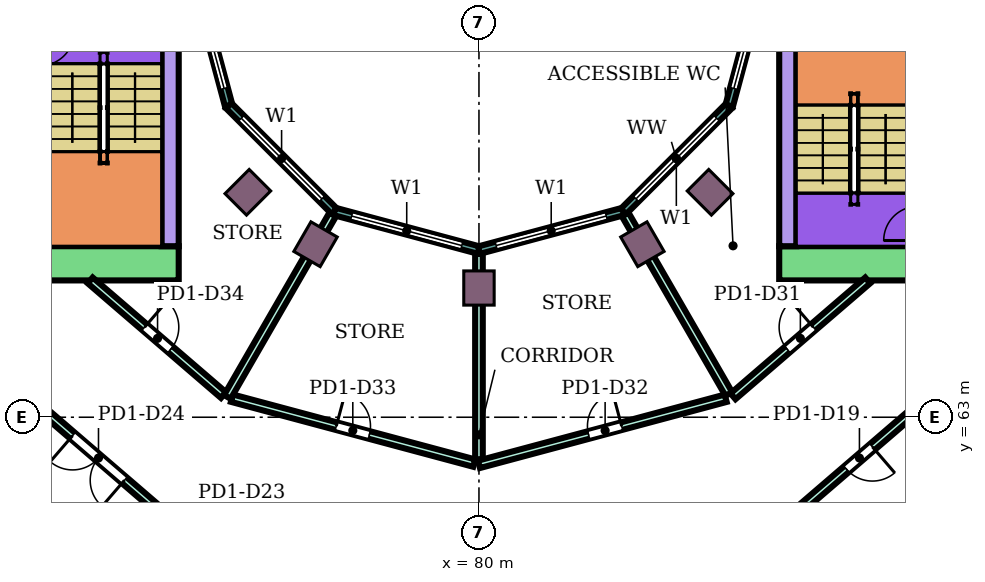
"""IFC4 building model, lengths in metres.
Left out: names, types, materials, properties, quantities, classifications, styles, units other than length and angle.
Written with IfcOpenShell. Run it as: python <this file> out.ifc"""

import sys

from ifc_helpers import new_model, si_unit, direction, frame, frame_2d, origin, origin_2d, place, context, subcontext, project, spatial, rectangle, extrude, element, fill, save


model = new_model("IFC4")
c1 = context("Model", 3, precision=1e-05, world=origin(), true_north=direction((0.0, 1.0)))
c2 = subcontext(c1, "Body", "Model", "MODEL_VIEW")
j1 = project(units=[si_unit("LENGTHUNIT", "METRE"), si_unit("PLANEANGLEUNIT", "RADIAN")], contexts=[c1])
p1 = place(None, origin())
s1 = spatial("IfcSite", under=j1, at=p1, CompositionType="ELEMENT")
p2 = place(p1, origin())
s2 = spatial("IfcBuilding", under=s1, at=p2, CompositionType="ELEMENT")
p3 = place(p2, frame((0.0, 0.0, 7.0)))
s3 = spatial("IfcBuildingStorey", under=s2, at=p3, CompositionType="ELEMENT", Elevation=7.0)
for number, where, z_axis, x_axis in (
    (1, (73.919, 68.919, 0.0), (0.0, 0.0, 1.0), (-0.707, -0.707, 0.0)),
    (2, (75.7, 67.552, 0.0), (0.0, 0.0, 1.0), (-0.5, -0.866, 0.0)),
    (3, (80.0, 66.4, 0.0), (0.0, 0.0, 1.0), (0.0, -1.0, 0.0)),
    (4, (84.3, 67.552, 0.0), (0.0, 0.0, 1.0), (0.5, -0.866, 0.0)),
    (5, (86.081, 68.919, 0.0), (0.0, 0.0, 1.0), (0.707, -0.707, 0.0)),
):
    element("IfcColumn", number, at=place(p3, frame(where, z_axis=z_axis, x_axis=x_axis)), inside=s3, PredefinedType="COLUMN", context=c2, shape_type="SweptSolid", body=[
        extrude(rectangle(XDim=0.9, YDim=0.8, at=origin_2d()), origin(), (0.0, 0.0, 1.0), 5.4),
    ])
p4 = place(p3, frame((87.9, 67.05, 0.0), z_axis=(0.0, 0.0, 1.0), x_axis=(1.0, 0.0, 0.0)))
e6 = element("IfcWall", 6, at=p4, inside=s3, PredefinedType="SHEAR", context=c2, shape_type="SweptSolid", body=[
    extrude(rectangle(XDim=14.6, YDim=0.9, at=frame_2d((7.3, 0.0))), origin(), (0.0, 0.0, 1.0), 4.95),
])
p5 = place(p4, frame((4.2, 0.0, 0.0)))
e7 = element("IfcOpeningElement", 7, at=p5, cuts=e6, PredefinedType="OPENING", context=c2, shape_type="SweptSolid", body=[
    extrude(rectangle(XDim=2.4, YDim=2.4, at=frame_2d((1.2, 1.2))), frame((0.0, 0.46, 0.0), z_axis=(0.0, -1.0, 0.0), x_axis=(1.0, 0.0, 0.0)), (0.0, 0.0, 1.0), 0.92),
])
p6 = place(p3, frame((88.125, 67.5, 0.0), z_axis=(0.0, 0.0, 1.0), x_axis=(0.0, 1.0, 0.0)))
e8 = element("IfcWall", 8, at=p6, inside=s3, PredefinedType="SHEAR", context=c2, shape_type="SweptSolid", body=[
    extrude(rectangle(XDim=7.5, YDim=0.45, at=frame_2d((3.75, 0.0))), origin(), (0.0, 0.0, 1.0), 4.95),
])
p7 = place(p3, frame((72.1, 67.05, 0.0), z_axis=(0.0, 0.0, 1.0), x_axis=(-1.0, 0.0, 0.0)))
e9 = element("IfcWall", 9, at=p7, inside=s3, PredefinedType="SHEAR", context=c2, shape_type="SweptSolid", body=[
    extrude(rectangle(XDim=14.6, YDim=0.9, at=frame_2d((7.3, 0.0))), origin(), (0.0, 0.0, 1.0), 4.95),
])
p8 = place(p7, frame((4.2, 0.0, 0.0)))
e10 = element("IfcOpeningElement", 10, at=p8, cuts=e9, PredefinedType="OPENING", context=c2, shape_type="SweptSolid", body=[
    extrude(rectangle(XDim=2.4, YDim=2.4, at=frame_2d((1.2, 1.2))), frame((0.0, 0.46, 0.0), z_axis=(0.0, -1.0, 0.0), x_axis=(1.0, 0.0, 0.0)), (0.0, 0.0, 1.0), 0.92),
])
p9 = place(p3, frame((71.875, 75.0, 0.0), z_axis=(0.0, 0.0, 1.0), x_axis=(0.0, -1.0, 0.0)))
e11 = element("IfcWall", 11, at=p9, inside=s3, PredefinedType="SHEAR", context=c2, shape_type="SweptSolid", body=[
    extrude(rectangle(XDim=7.5, YDim=0.45, at=frame_2d((3.75, 0.0))), origin(), (0.0, 0.0, 1.0), 4.95),
])
p10 = place(p3, frame((72.396, 75.0, 0.0), z_axis=(0.0, 0.0, 1.0), x_axis=(0.258789828301, -0.965933654434, 0.0)))
e12 = element("IfcWall", 12, at=p10, inside=s3, PredefinedType="NOTDEFINED", context=c2, shape_type="SweptSolid", body=[
    extrude(rectangle(XDim=3.936, YDim=0.2, at=frame_2d((1.968, 0.0))), origin(), (0.0, 0.0, 1.0), 5.4),
])
p11 = place(p10, frame((0.468, 0.0, 0.9)))
e13 = element("IfcOpeningElement", 13, at=p11, cuts=e12, PredefinedType="OPENING", context=c2, shape_type="SweptSolid", body=[
    extrude(rectangle(XDim=3.0, YDim=2.3, at=frame_2d((1.5, 1.15))), frame((0.0, 0.11, 0.0), z_axis=(0.0, -1.0, 0.0), x_axis=(1.0, 0.0, 0.0)), (0.0, 0.0, 1.0), 0.22),
])
p12 = place(p3, frame((73.415, 71.198, 0.0), z_axis=(0.0, 0.0, 1.0), x_axis=(0.707106781187, -0.707106781187, 0.0)))
e14 = element("IfcWall", 14, at=p12, inside=s3, PredefinedType="NOTDEFINED", context=c2, shape_type="SweptSolid", body=[
    extrude(rectangle(XDim=3.936, YDim=0.2, at=frame_2d((1.968, 0.0))), origin(), (0.0, 0.0, 1.0), 5.4),
])
p13 = place(p12, frame((0.468, 0.0, 0.9)))
e15 = element("IfcOpeningElement", 15, at=p13, cuts=e14, PredefinedType="OPENING", context=c2, shape_type="SweptSolid", body=[
    extrude(rectangle(XDim=3.0, YDim=2.3, at=frame_2d((1.5, 1.15))), frame((0.0, 0.11, 0.0), z_axis=(0.0, -1.0, 0.0), x_axis=(1.0, 0.0, 0.0)), (0.0, 0.0, 1.0), 0.22),
])
p14 = place(p3, frame((76.198, 68.415, 0.0), z_axis=(0.0, 0.0, 1.0), x_axis=(0.965933654434, -0.258789828301, 0.0)))
e16 = element("IfcWall", 16, at=p14, inside=s3, PredefinedType="NOTDEFINED", context=c2, shape_type="SweptSolid", body=[
    extrude(rectangle(XDim=3.936, YDim=0.2, at=frame_2d((1.968, 0.0))), origin(), (0.0, 0.0, 1.0), 5.4),
])
p15 = place(p14, frame((0.468, 0.0, 0.9)))
e17 = element("IfcOpeningElement", 17, at=p15, cuts=e16, PredefinedType="OPENING", context=c2, shape_type="SweptSolid", body=[
    extrude(rectangle(XDim=3.0, YDim=2.3, at=frame_2d((1.5, 1.15))), frame((0.0, 0.11, 0.0), z_axis=(0.0, -1.0, 0.0), x_axis=(1.0, 0.0, 0.0)), (0.0, 0.0, 1.0), 0.22),
])
p16 = place(p3, frame((80.0, 67.396, 0.0), z_axis=(0.0, 0.0, 1.0), x_axis=(0.965933654434, 0.258789828301, 0.0)))
e18 = element("IfcWall", 18, at=p16, inside=s3, PredefinedType="NOTDEFINED", context=c2, shape_type="SweptSolid", body=[
    extrude(rectangle(XDim=3.936, YDim=0.2, at=frame_2d((1.968, 0.0))), origin(), (0.0, 0.0, 1.0), 5.4),
])
p17 = place(p16, frame((0.468, 0.0, 0.9)))
e19 = element("IfcOpeningElement", 19, at=p17, cuts=e18, PredefinedType="OPENING", context=c2, shape_type="SweptSolid", body=[
    extrude(rectangle(XDim=3.0, YDim=2.3, at=frame_2d((1.5, 1.15))), frame((0.0, 0.11, 0.0), z_axis=(0.0, -1.0, 0.0), x_axis=(1.0, 0.0, 0.0)), (0.0, 0.0, 1.0), 0.22),
])
p18 = place(p3, frame((83.802, 68.415, 0.0), z_axis=(0.0, 0.0, 1.0), x_axis=(0.707106781187, 0.707106781187, 0.0)))
e20 = element("IfcWall", 20, at=p18, inside=s3, PredefinedType="NOTDEFINED", context=c2, shape_type="SweptSolid", body=[
    extrude(rectangle(XDim=3.936, YDim=0.2, at=frame_2d((1.968, 0.0))), origin(), (0.0, 0.0, 1.0), 5.4),
])
p19 = place(p18, frame((0.468, 0.0, 0.9)))
e21 = element("IfcOpeningElement", 21, at=p19, cuts=e20, PredefinedType="OPENING", context=c2, shape_type="SweptSolid", body=[
    extrude(rectangle(XDim=3.0, YDim=2.3, at=frame_2d((1.5, 1.15))), frame((0.0, 0.11, 0.0), z_axis=(0.0, -1.0, 0.0), x_axis=(1.0, 0.0, 0.0)), (0.0, 0.0, 1.0), 0.22),
])
p20 = place(p3, frame((86.585, 71.198, 0.0), z_axis=(0.0, 0.0, 1.0), x_axis=(0.258789828301, 0.965933654434, 0.0)))
e22 = element("IfcWall", 22, at=p20, inside=s3, PredefinedType="NOTDEFINED", context=c2, shape_type="SweptSolid", body=[
    extrude(rectangle(XDim=3.936, YDim=0.2, at=frame_2d((1.968, 0.0))), origin(), (0.0, 0.0, 1.0), 5.4),
])
p21 = place(p20, frame((0.468, 0.0, 0.9)))
e23 = element("IfcOpeningElement", 23, at=p21, cuts=e22, PredefinedType="OPENING", context=c2, shape_type="SweptSolid", body=[
    extrude(rectangle(XDim=3.0, YDim=2.3, at=frame_2d((1.5, 1.15))), frame((0.0, 0.11, 0.0), z_axis=(0.0, -1.0, 0.0), x_axis=(1.0, 0.0, 0.0)), (0.0, 0.0, 1.0), 0.22),
])
p22 = place(p3, frame((66.302, 65.1, 0.0), z_axis=(0.0, 0.0, 1.0), x_axis=(0.757895579626, -0.652375881209, 0.0)))
e24 = element("IfcWall", 24, at=p22, inside=s3, PredefinedType="PARTITIONING", context=c2, shape_type="SweptSolid", body=[
    extrude(rectangle(XDim=7.062, YDim=0.2, at=frame_2d((3.531, 0.0))), origin(), (0.0, 0.0, 1.0), 4.95),
])
p23 = place(p22, frame((3.964, 0.0, 0.0)))
e25 = element("IfcOpeningElement", 25, at=p23, cuts=e24, PredefinedType="OPENING", context=c2, shape_type="SweptSolid", body=[
    extrude(rectangle(XDim=1.8, YDim=2.1, at=frame_2d((0.9, 1.05))), frame((0.0, 0.11, 0.0), z_axis=(0.0, -1.0, 0.0), x_axis=(1.0, 0.0, 0.0)), (0.0, 0.0, 1.0), 0.22),
])
p24 = place(p22, frame((0.906, 0.0, 0.0)))
e26 = element("IfcOpeningElement", 26, at=p24, cuts=e24, PredefinedType="OPENING", context=c2, shape_type="SweptSolid", body=[
    extrude(rectangle(XDim=0.9, YDim=2.1, at=frame_2d((0.45, 1.05))), frame((0.0, 0.11, 0.0), z_axis=(0.0, -1.0, 0.0), x_axis=(1.0, 0.0, 0.0)), (0.0, 0.0, 1.0), 0.22),
])
p25 = place(p3, frame((69.771, 66.6, 0.0), z_axis=(0.0, 0.0, 1.0), x_axis=(0.758040611529, -0.652207352974, 0.0)))
e27 = element("IfcWall", 27, at=p25, inside=s3, PredefinedType="PARTITIONING", context=c2, shape_type="SweptSolid", body=[
    extrude(rectangle(XDim=4.625, YDim=0.2, at=frame_2d((2.312, 0.0))), origin(), (0.0, 0.0, 1.0), 4.95),
])
p26 = place(p25, frame((1.887, 0.0, 0.0)))
e28 = element("IfcOpeningElement", 28, at=p26, cuts=e27, PredefinedType="OPENING", context=c2, shape_type="SweptSolid", body=[
    extrude(rectangle(XDim=0.9, YDim=2.1, at=frame_2d((0.45, 1.05))), frame((0.0, 0.11, 0.0), z_axis=(0.0, -1.0, 0.0), x_axis=(1.0, 0.0, 0.0)), (0.0, 0.0, 1.0), 0.22),
])
p27 = place(p3, frame((73.499, 63.502, 0.0), z_axis=(0.0, 0.0, 1.0), x_axis=(0.965923617359, -0.258827288799, 0.0)))
e29 = element("IfcWall", 29, at=p27, inside=s3, PredefinedType="PARTITIONING", context=c2, shape_type="SweptSolid", body=[
    extrude(rectangle(XDim=6.601, YDim=0.2, at=frame_2d((3.3, 0.0))), origin(), (0.0, 0.0, 1.0), 4.95),
])
p28 = place(p27, frame((2.844, 0.0, 0.0)))
e30 = element("IfcOpeningElement", 30, at=p28, cuts=e29, PredefinedType="OPENING", context=c2, shape_type="SweptSolid", body=[
    extrude(rectangle(XDim=0.9, YDim=2.1, at=frame_2d((0.45, 1.05))), frame((0.0, 0.11, 0.0), z_axis=(0.0, -1.0, 0.0), x_axis=(1.0, 0.0, 0.0)), (0.0, 0.0, 1.0), 0.22),
])
p29 = place(p3, frame((73.38, 63.534, 0.0), z_axis=(0.0, 0.0, 1.0), x_axis=(0.500052970826, 0.865994818904, 0.0)))
e31 = element("IfcWall", 31, at=p29, inside=s3, PredefinedType="PARTITIONING", context=c2, shape_type="SweptSolid", body=[
    extrude(rectangle(XDim=5.542, YDim=0.2, at=frame_2d((2.771, 0.0))), origin(), (0.0, 0.0, 1.0), 4.95),
])
p30 = place(p3, frame((80.0, 61.89, 0.0), z_axis=(0.0, 0.0, 1.0), x_axis=(0.0, 1.0, 0.0)))
e32 = element("IfcWall", 32, at=p30, inside=s3, PredefinedType="PARTITIONING", context=c2, shape_type="SweptSolid", body=[
    extrude(rectangle(XDim=5.411, YDim=0.2, at=frame_2d((2.706, 0.0))), origin(), (0.0, 0.0, 1.0), 4.95),
])
p31 = place(p3, frame((80.0, 61.76, 0.0), z_axis=(0.0, 0.0, 1.0), x_axis=(0.965932810031, 0.258792980017, 0.0)))
e33 = element("IfcWall", 33, at=p31, inside=s3, PredefinedType="PARTITIONING", context=c2, shape_type="SweptSolid", body=[
    extrude(rectangle(XDim=6.721, YDim=0.2, at=frame_2d((3.36, 0.0))), origin(), (0.0, 0.0, 1.0), 4.95),
])
p32 = place(p31, frame((2.987, 0.0, 0.0)))
e34 = element("IfcOpeningElement", 34, at=p32, cuts=e33, PredefinedType="OPENING", context=c2, shape_type="SweptSolid", body=[
    extrude(rectangle(XDim=0.9, YDim=2.1, at=frame_2d((0.45, 1.05))), frame((0.0, 0.11, 0.0), z_axis=(0.0, -1.0, 0.0), x_axis=(1.0, 0.0, 0.0)), (0.0, 0.0, 1.0), 0.22),
])
p33 = place(p3, frame((83.849, 68.333, 0.0), z_axis=(0.0, 0.0, 1.0), x_axis=(0.49997314572, -0.866040907555, 0.0)))
e35 = element("IfcWall", 35, at=p33, inside=s3, PredefinedType="PARTITIONING", context=c2, shape_type="SweptSolid", body=[
    extrude(rectangle(XDim=5.451, YDim=0.2, at=frame_2d((2.726, 0.0))), origin(), (0.0, 0.0, 1.0), 4.95),
])
p34 = place(p3, frame((86.685, 63.551, 0.0), z_axis=(0.0, 0.0, 1.0), x_axis=(0.758049900748, 0.652196556244, 0.0)))
e36 = element("IfcWall", 36, at=p34, inside=s3, PredefinedType="PARTITIONING", context=c2, shape_type="SweptSolid", body=[
    extrude(rectangle(XDim=4.675, YDim=0.2, at=frame_2d((2.337, 0.0))), origin(), (0.0, 0.0, 1.0), 4.95),
])
p35 = place(p34, frame((1.887, 0.0, 0.0)))
e37 = element("IfcOpeningElement", 37, at=p35, cuts=e36, PredefinedType="OPENING", context=c2, shape_type="SweptSolid", body=[
    extrude(rectangle(XDim=0.9, YDim=2.1, at=frame_2d((0.45, 1.05))), frame((0.0, 0.11, 0.0), z_axis=(0.0, -1.0, 0.0), x_axis=(1.0, 0.0, 0.0)), (0.0, 0.0, 1.0), 0.22),
])
p36 = place(p3, frame((88.436, 60.573, 0.0), z_axis=(0.0, 0.0, 1.0), x_axis=(0.758186248639, 0.652038045189, 0.0)))
e38 = element("IfcWall", 38, at=p36, inside=s3, PredefinedType="PARTITIONING", context=c2, shape_type="SweptSolid", body=[
    extrude(rectangle(XDim=6.882, YDim=0.2, at=frame_2d((3.441, 0.0))), origin(), (0.0, 0.0, 1.0), 4.95),
])
p37 = place(p36, frame((4.835, 0.0, 0.0)))
e39 = element("IfcOpeningElement", 39, at=p37, cuts=e38, PredefinedType="OPENING", context=c2, shape_type="SweptSolid", body=[
    extrude(rectangle(XDim=1.8, YDim=2.1, at=frame_2d((0.9, 1.05))), frame((0.0, 0.11, 0.0), z_axis=(0.0, -1.0, 0.0), x_axis=(1.0, 0.0, 0.0)), (0.0, 0.0, 1.0), 0.22),
])
p38 = place(p36, frame((1.627, 0.0, 0.0)))
e40 = element("IfcOpeningElement", 40, at=p38, cuts=e38, PredefinedType="OPENING", context=c2, shape_type="SweptSolid", body=[
    extrude(rectangle(XDim=0.9, YDim=2.1, at=frame_2d((0.45, 1.05))), frame((0.0, 0.11, 0.0), z_axis=(0.0, -1.0, 0.0), x_axis=(1.0, 0.0, 0.0)), (0.0, 0.0, 1.0), 0.22),
])
p39 = place(p11, origin())
e41 = element("IfcWindow", 41, at=p39, inside=s3, PartitioningType="SINGLE_PANEL", PredefinedType="WINDOW", context=c2, shape_type="SweptSolid", body=[
    extrude(rectangle(XDim=3.0, YDim=2.3, at=frame_2d((1.5, 1.15))), frame((0.0, 0.03, 0.0), z_axis=(0.0, -1.0, 0.0), x_axis=(1.0, 0.0, 0.0)), (0.0, 0.0, 1.0), 0.06),
])
fill(e13, e41)
p40 = place(p13, origin())
e42 = element("IfcWindow", 42, at=p40, inside=s3, PartitioningType="SINGLE_PANEL", PredefinedType="WINDOW", context=c2, shape_type="SweptSolid", body=[
    extrude(rectangle(XDim=3.0, YDim=2.3, at=frame_2d((1.5, 1.15))), frame((0.0, 0.03, 0.0), z_axis=(0.0, -1.0, 0.0), x_axis=(1.0, 0.0, 0.0)), (0.0, 0.0, 1.0), 0.06),
])
fill(e15, e42)
p41 = place(p15, origin())
e43 = element("IfcWindow", 43, at=p41, inside=s3, PartitioningType="SINGLE_PANEL", PredefinedType="WINDOW", context=c2, shape_type="SweptSolid", body=[
    extrude(rectangle(XDim=3.0, YDim=2.3, at=frame_2d((1.5, 1.15))), frame((0.0, 0.03, 0.0), z_axis=(0.0, -1.0, 0.0), x_axis=(1.0, 0.0, 0.0)), (0.0, 0.0, 1.0), 0.06),
])
fill(e17, e43)
p42 = place(p17, origin())
e44 = element("IfcWindow", 44, at=p42, inside=s3, PartitioningType="SINGLE_PANEL", PredefinedType="WINDOW", context=c2, shape_type="SweptSolid", body=[
    extrude(rectangle(XDim=3.0, YDim=2.3, at=frame_2d((1.5, 1.15))), frame((0.0, 0.03, 0.0), z_axis=(0.0, -1.0, 0.0), x_axis=(1.0, 0.0, 0.0)), (0.0, 0.0, 1.0), 0.06),
])
fill(e19, e44)
p43 = place(p19, origin())
e45 = element("IfcWindow", 45, at=p43, inside=s3, PartitioningType="SINGLE_PANEL", PredefinedType="WINDOW", context=c2, shape_type="SweptSolid", body=[
    extrude(rectangle(XDim=3.0, YDim=2.3, at=frame_2d((1.5, 1.15))), frame((0.0, 0.03, 0.0), z_axis=(0.0, -1.0, 0.0), x_axis=(1.0, 0.0, 0.0)), (0.0, 0.0, 1.0), 0.06),
])
fill(e21, e45)
p44 = place(p21, origin())
e46 = element("IfcWindow", 46, at=p44, inside=s3, PartitioningType="SINGLE_PANEL", PredefinedType="WINDOW", context=c2, shape_type="SweptSolid", body=[
    extrude(rectangle(XDim=3.0, YDim=2.3, at=frame_2d((1.5, 1.15))), frame((0.0, 0.03, 0.0), z_axis=(0.0, -1.0, 0.0), x_axis=(1.0, 0.0, 0.0)), (0.0, 0.0, 1.0), 0.06),
])
fill(e23, e46)
p45 = place(p38, frame((0.9, 0.0, 0.0), z_axis=(0.0, 0.0, 1.0), x_axis=(-1.0, 0.0, 0.0)))
e47 = element("IfcDoor", 47, at=p45, inside=s3, OperationType="SINGLE_SWING_LEFT", PredefinedType="DOOR", context=c2, shape_type="SweptSolid", body=[
    extrude(rectangle(XDim=0.9, YDim=2.1, at=frame_2d((0.45, 1.05))), frame((0.0, 0.025, 0.0), z_axis=(0.0, -1.0, 0.0), x_axis=(1.0, 0.0, 0.0)), (0.0, 0.0, 1.0), 0.05),
])
fill(e40, e47)
p46 = place(p23, frame((1.8, 0.0, 0.0), z_axis=(0.0, 0.0, 1.0), x_axis=(-1.0, 0.0, 0.0)))
e48 = element("IfcDoor", 48, at=p46, inside=s3, OperationType="DOUBLE_DOOR_SINGLE_SWING", PredefinedType="DOOR", context=c2, shape_type="SweptSolid", body=[
    extrude(rectangle(XDim=1.8, YDim=2.1, at=frame_2d((0.9, 1.05))), frame((0.0, 0.025, 0.0), z_axis=(0.0, -1.0, 0.0), x_axis=(1.0, 0.0, 0.0)), (0.0, 0.0, 1.0), 0.05),
])
fill(e25, e48)
p47 = place(p35, origin())
e49 = element("IfcDoor", 49, at=p47, inside=s3, OperationType="SINGLE_SWING_RIGHT", PredefinedType="DOOR", context=c2, shape_type="SweptSolid", body=[
    extrude(rectangle(XDim=0.9, YDim=2.1, at=frame_2d((0.45, 1.05))), frame((0.0, 0.025, 0.0), z_axis=(0.0, -1.0, 0.0), x_axis=(1.0, 0.0, 0.0)), (0.0, 0.0, 1.0), 0.05),
])
fill(e37, e49)
p48 = place(p32, origin())
e50 = element("IfcDoor", 50, at=p48, inside=s3, OperationType="SINGLE_SWING_RIGHT", PredefinedType="DOOR", context=c2, shape_type="SweptSolid", body=[
    extrude(rectangle(XDim=0.9, YDim=2.1, at=frame_2d((0.45, 1.05))), frame((0.0, 0.025, 0.0), z_axis=(0.0, -1.0, 0.0), x_axis=(1.0, 0.0, 0.0)), (0.0, 0.0, 1.0), 0.05),
])
fill(e34, e50)
p49 = place(p28, origin())
e51 = element("IfcDoor", 51, at=p49, inside=s3, OperationType="SINGLE_SWING_LEFT", PredefinedType="DOOR", context=c2, shape_type="SweptSolid", body=[
    extrude(rectangle(XDim=0.9, YDim=2.1, at=frame_2d((0.45, 1.05))), frame((0.0, 0.025, 0.0), z_axis=(0.0, -1.0, 0.0), x_axis=(1.0, 0.0, 0.0)), (0.0, 0.0, 1.0), 0.05),
])
fill(e30, e51)
p50 = place(p26, origin())
e52 = element("IfcDoor", 52, at=p50, inside=s3, OperationType="SINGLE_SWING_LEFT", PredefinedType="DOOR", context=c2, shape_type="SweptSolid", body=[
    extrude(rectangle(XDim=0.9, YDim=2.1, at=frame_2d((0.45, 1.05))), frame((0.0, 0.025, 0.0), z_axis=(0.0, -1.0, 0.0), x_axis=(1.0, 0.0, 0.0)), (0.0, 0.0, 1.0), 0.05),
])
fill(e28, e52)
save(model, sys.argv[1])
